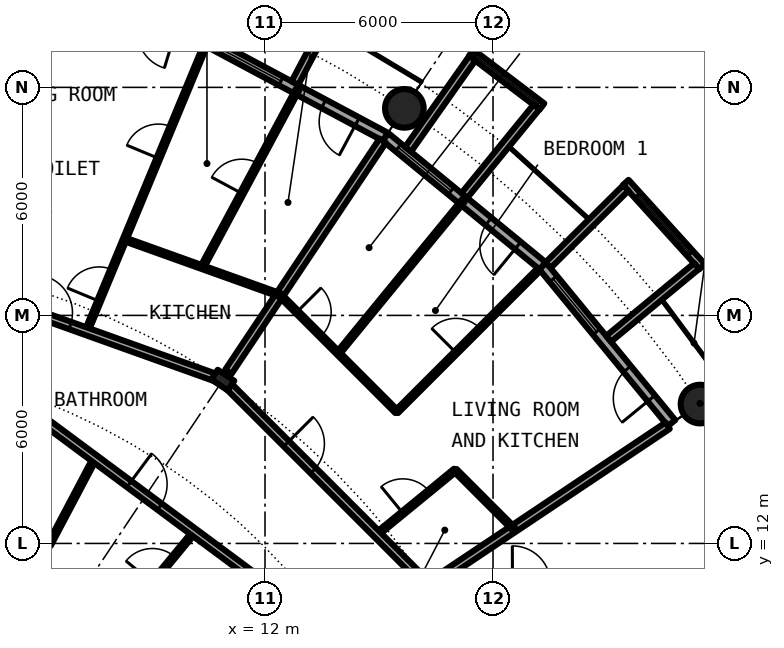
"""IFC4 building model, lengths in metres.
Left out: names, types, materials, properties, quantities, classifications, styles, units other than length and angle.
Written with IfcOpenShell. Run it as: python <this file> out.ifc"""

import sys

from ifc_helpers import new_model, si_unit, direction, frame, frame_2d, origin, origin_2d, place, context, subcontext, project, spatial, rectangle, circle, hollow_circle, i_section, extrude, element, fill, save


model = new_model("IFC4")
c1 = context("Model", 3, precision=1e-05, world=origin(), true_north=direction((0.0, 1.0)))
c2 = subcontext(c1, "Body", "Model", "MODEL_VIEW")
j1 = project(units=[si_unit("LENGTHUNIT", "METRE"), si_unit("PLANEANGLEUNIT", "RADIAN")], contexts=[c1])
p1 = place(None, origin())
s1 = spatial("IfcSite", under=j1, at=p1, CompositionType="ELEMENT")
p2 = place(p1, origin())
s2 = spatial("IfcBuilding", under=s1, at=p2, CompositionType="ELEMENT")
p3 = place(p2, frame((0.0, 0.0, 63.6)))
s3 = spatial("IfcBuildingStorey", under=s2, at=p3, CompositionType="ELEMENT", Elevation=63.6)
for number, where, z_axis, x_axis in (
    (1, (23.448, 15.667, 0.0), (0.0, 0.0, 1.0), (1.0, 0.0, 0.0)),
    (2, (15.667, 23.448, 0.0), (0.0, 0.0, 1.0), (1.0, 0.0, 0.0)),
):
    element("IfcColumn", number, at=place(p3, frame(where, z_axis=z_axis, x_axis=x_axis)), inside=s3, PredefinedType="COLUMN", context=c2, shape_type="SweptSolid", body=[
        extrude(hollow_circle(Radius=0.508, WallThickness=0.04, at=origin_2d()), origin(), (0.0, 0.0, 1.0), 3.05),
    ])
p4 = place(p3, frame((10.889, 16.297, 0.0), z_axis=(0.0, 0.0, 1.0), x_axis=(0.55557023302, 0.831469612303, 0.0)))
e3 = element("IfcColumn", 3, at=p4, inside=s3, PredefinedType="COLUMN", context=c2, shape_type="SweptSolid", body=[
    extrude(i_section(OverallWidth=0.306, OverallDepth=0.524, WebThickness=0.021, FlangeThickness=0.04, FilletRadius=0.027, at=origin_2d()), origin(), (0.0, 0.0, 1.0), 3.05),
])
p5 = place(p3, frame((22.699, 15.167, 0.0), z_axis=(0.0, 0.0, 1.0), x_axis=(-0.634382322723, 0.773019449054, 0.0)))
e4 = element("IfcWall", 4, at=p5, inside=s3, PredefinedType="SOLIDWALL", context=c2, shape_type="SweptSolid", body=[
    extrude(rectangle(XDim=5.352, YDim=0.25, at=frame_2d((2.676, 0.0))), origin(), (0.0, 0.0, 1.0), 2.7),
])
p6 = place(p5, frame((0.841, 0.0, 0.0)))
e5 = element("IfcOpeningElement", 5, at=p6, cuts=e4, PredefinedType="OPENING", context=c2, shape_type="SweptSolid", body=[
    extrude(rectangle(XDim=1.0, YDim=2.2, at=frame_2d((0.5, 1.1))), frame((0.0, 0.135, 0.0), z_axis=(0.0, -1.0, 0.0), x_axis=(1.0, 0.0, 0.0)), (0.0, 0.0, 1.0), 0.27),
])
p7 = place(p5, frame((3.111, 0.0, 0.3)))
e6 = element("IfcOpeningElement", 6, at=p7, cuts=e4, PredefinedType="OPENING", context=c2, shape_type="SweptSolid", body=[
    extrude(rectangle(XDim=1.8, YDim=2.1, at=frame_2d((0.9, 1.05))), frame((0.0, 0.135, 0.0), z_axis=(0.0, -1.0, 0.0), x_axis=(1.0, 0.0, 0.0)), (0.0, 0.0, 1.0), 0.27),
])
p8 = place(p3, frame((23.503, 19.282, -0.03), z_axis=(0.0, 0.0, 1.0), x_axis=(-0.671506829416, 0.740998365753, 0.0)))
e7 = element("IfcWall", 7, at=p8, inside=s3, PredefinedType="SOLIDWALL", context=c2, shape_type="SweptSolid", body=[
    extrude(rectangle(XDim=2.993, YDim=0.2, at=frame_2d((1.497, 0.0))), origin(), (0.0, 0.0, 1.0), 2.73),
])
p9 = place(p8, frame((0.457, 0.0, 0.33)))
e8 = element("IfcOpeningElement", 8, at=p9, cuts=e7, PredefinedType="OPENING", context=c2, shape_type="SweptSolid", body=[
    extrude(circle(Radius=1.04, at=frame_2d((1.04, 1.04))), frame((0.0, 0.11, 0.0), z_axis=(0.0, -1.0, 0.0), x_axis=(1.0, 0.0, 0.0)), (0.0, 0.0, 1.0), 0.22),
])
p10 = place(p3, frame((21.041, 17.384, -0.03), z_axis=(0.0, 0.0, 1.0), x_axis=(0.770784861449, 0.63709551667, 0.0)))
e9 = element("IfcWall", 9, at=p10, inside=s3, PredefinedType="SOLIDWALL", context=c2, shape_type="SweptSolid", body=[
    extrude(rectangle(XDim=3.006, YDim=0.2, at=frame_2d((1.503, 0.0))), origin(), (0.0, 0.0, 1.0), 2.73),
])
p11 = place(p3, frame((19.45, 19.323, -0.03), z_axis=(0.0, 0.0, 1.0), x_axis=(0.709727076896, 0.704476739375, 0.0)))
e10 = element("IfcWall", 10, at=p11, inside=s3, PredefinedType="SOLIDWALL", context=c2, shape_type="SweptSolid", body=[
    extrude(rectangle(XDim=2.883, YDim=0.2, at=frame_2d((1.441, 0.0))), origin(), (0.0, 0.0, 1.0), 2.73),
])
p12 = place(p3, frame((19.304, 19.304, 0.0), z_axis=(0.0, 0.0, 1.0), x_axis=(-0.773019449054, 0.634382322723, 0.0)))
e11 = element("IfcWall", 11, at=p12, inside=s3, PredefinedType="SOLIDWALL", context=c2, shape_type="SweptSolid", body=[
    extrude(rectangle(XDim=5.352, YDim=0.25, at=frame_2d((2.676, 0.0))), origin(), (0.0, 0.0, 1.0), 2.7),
])
p13 = place(p12, frame((0.841, 0.0, 0.0)))
e12 = element("IfcOpeningElement", 12, at=p13, cuts=e11, PredefinedType="OPENING", context=c2, shape_type="SweptSolid", body=[
    extrude(rectangle(XDim=1.0, YDim=2.2, at=frame_2d((0.5, 1.1))), frame((0.0, 0.135, 0.0), z_axis=(0.0, -1.0, 0.0), x_axis=(1.0, 0.0, 0.0)), (0.0, 0.0, 1.0), 0.27),
])
p14 = place(p12, frame((3.111, 0.0, 0.3)))
e13 = element("IfcOpeningElement", 13, at=p14, cuts=e11, PredefinedType="OPENING", context=c2, shape_type="SweptSolid", body=[
    extrude(rectangle(XDim=1.8, YDim=2.1, at=frame_2d((0.9, 1.05))), frame((0.0, 0.135, 0.0), z_axis=(0.0, -1.0, 0.0), x_axis=(1.0, 0.0, 0.0)), (0.0, 0.0, 1.0), 0.27),
])
p15 = place(p3, frame((19.289, 23.497, -0.03), z_axis=(0.0, 0.0, 1.0), x_axis=(-0.796842165306, 0.60418752353, 0.0)))
e14 = element("IfcWall", 14, at=p15, inside=s3, PredefinedType="SOLIDWALL", context=c2, shape_type="SweptSolid", body=[
    extrude(rectangle(XDim=2.337, YDim=0.2, at=frame_2d((1.168, 0.0))), origin(), (0.0, 0.0, 1.0), 2.73),
])
p16 = place(p15, frame((0.128, 0.0, 0.33)))
e15 = element("IfcOpeningElement", 15, at=p16, cuts=e14, PredefinedType="OPENING", context=c2, shape_type="SweptSolid", body=[
    extrude(circle(Radius=1.04, at=frame_2d((1.04, 1.04))), frame((0.0, 0.11, 0.0), z_axis=(0.0, -1.0, 0.0), x_axis=(1.0, 0.0, 0.0)), (0.0, 0.0, 1.0), 0.22),
])
p17 = place(p3, frame((17.246, 21.155, -0.03), z_axis=(0.0, 0.0, 1.0), x_axis=(0.631741648902, 0.775179004516, 0.0)))
e16 = element("IfcWall", 16, at=p17, inside=s3, PredefinedType="SOLIDWALL", context=c2, shape_type="SweptSolid", body=[
    extrude(rectangle(XDim=3.006, YDim=0.2, at=frame_2d((1.503, 0.0))), origin(), (0.0, 0.0, 1.0), 2.73),
])
p18 = place(p3, frame((15.765, 22.37, -0.03), z_axis=(0.0, 0.0, 1.0), x_axis=(0.576274612209, 0.817256123454, 0.0)))
e17 = element("IfcWall", 17, at=p18, inside=s3, PredefinedType="SOLIDWALL", context=c2, shape_type="SweptSolid", body=[
    extrude(rectangle(XDim=2.933, YDim=0.2, at=frame_2d((1.466, 0.0))), origin(), (0.0, 0.0, 1.0), 2.73),
])
p19 = place(p3, frame((15.167, 22.699, 0.0), z_axis=(0.0, 0.0, 1.0), x_axis=(-0.881915646801, 0.471407246368, 0.0)))
e18 = element("IfcWall", 18, at=p19, inside=s3, PredefinedType="SOLIDWALL", context=c2, shape_type="SweptSolid", body=[
    extrude(rectangle(XDim=5.352, YDim=0.25, at=frame_2d((2.676, 0.0))), origin(), (0.0, 0.0, 1.0), 2.7),
])
p20 = place(p19, frame((0.841, 0.0, 0.0)))
e19 = element("IfcOpeningElement", 19, at=p20, cuts=e18, PredefinedType="OPENING", context=c2, shape_type="SweptSolid", body=[
    extrude(rectangle(XDim=1.0, YDim=2.2, at=frame_2d((0.5, 1.1))), frame((0.0, 0.135, 0.0), z_axis=(0.0, -1.0, 0.0), x_axis=(1.0, 0.0, 0.0)), (0.0, 0.0, 1.0), 0.27),
])
p21 = place(p19, frame((3.111, 0.0, 0.3)))
e20 = element("IfcOpeningElement", 20, at=p21, cuts=e18, PredefinedType="OPENING", context=c2, shape_type="SweptSolid", body=[
    extrude(rectangle(XDim=1.8, YDim=2.1, at=frame_2d((0.9, 1.05))), frame((0.0, 0.135, 0.0), z_axis=(0.0, -1.0, 0.0), x_axis=(1.0, 0.0, 0.0)), (0.0, 0.0, 1.0), 0.27),
])
p22 = place(p3, frame((12.787, 24.113, -0.03), z_axis=(0.0, 0.0, 1.0), x_axis=(0.468365282436, 0.883534924159, 0.0)))
e21 = element("IfcWall", 21, at=p22, inside=s3, PredefinedType="SOLIDWALL", context=c2, shape_type="SweptSolid", body=[
    extrude(rectangle(XDim=3.006, YDim=0.2, at=frame_2d((1.503, 0.0))), origin(), (0.0, 0.0, 1.0), 2.73),
])
p23 = place(p3, frame((4.909, 5.958, 0.0), z_axis=(0.0, 0.0, 1.0), x_axis=(0.635976043025, 0.771708800454, 0.0)))
e22 = element("IfcWall", 22, at=p23, inside=s3, PredefinedType="PARTITIONING", context=c2, shape_type="SweptSolid", body=[
    extrude(rectangle(XDim=8.213, YDim=0.1, at=frame_2d((4.106, 0.0))), origin(), (0.0, 0.0, 1.0), 2.7),
])
p24 = place(p23, frame((6.49, 0.0, 0.0)))
e23 = element("IfcOpeningElement", 23, at=p24, cuts=e22, PredefinedType="OPENING", context=c2, shape_type="SweptSolid", body=[
    extrude(rectangle(XDim=0.9, YDim=2.3, at=frame_2d((0.45, 1.15))), frame((0.0, 0.06, 0.0), z_axis=(0.0, -1.0, 0.0), x_axis=(1.0, 0.0, 0.0)), (0.0, 0.0, 1.0), 0.12),
])
p25 = place(p23, frame((2.384, 0.0, 0.0)))
e24 = element("IfcOpeningElement", 24, at=p25, cuts=e22, PredefinedType="OPENING", context=c2, shape_type="SweptSolid", body=[
    extrude(rectangle(XDim=0.9, YDim=2.3, at=frame_2d((0.45, 1.15))), frame((0.0, 0.06, 0.0), z_axis=(0.0, -1.0, 0.0), x_axis=(1.0, 0.0, 0.0)), (0.0, 0.0, 1.0), 0.12),
])
p26 = place(p3, frame((6.318, 11.96, 0.0), z_axis=(0.0, 0.0, 1.0), x_axis=(0.467001992543, 0.884256263173, 0.0)))
e25 = element("IfcWall", 25, at=p26, inside=s3, PredefinedType="PARTITIONING", context=c2, shape_type="SweptSolid", body=[
    extrude(rectangle(XDim=2.572, YDim=0.1, at=frame_2d((1.286, 0.0))), origin(), (0.0, 0.0, 1.0), 2.7),
])
p27 = place(p3, frame((7.302, 17.58, 0.0), z_axis=(0.0, 0.0, 1.0), x_axis=(0.383616168183, 0.923492628833, 0.0)))
e26 = element("IfcWall", 26, at=p27, inside=s3, PredefinedType="PARTITIONING", context=c2, shape_type="SweptSolid", body=[
    extrude(rectangle(XDim=8.138, YDim=0.1, at=frame_2d((4.069, 0.0))), origin(), (0.0, 0.0, 1.0), 2.7),
])
p28 = place(p27, frame((0.861, 0.0, 0.0)))
e27 = element("IfcOpeningElement", 27, at=p28, cuts=e26, PredefinedType="OPENING", context=c2, shape_type="SweptSolid", body=[
    extrude(rectangle(XDim=0.9, YDim=2.3, at=frame_2d((0.45, 1.15))), frame((0.0, 0.06, 0.0), z_axis=(0.0, -1.0, 0.0), x_axis=(1.0, 0.0, 0.0)), (0.0, 0.0, 1.0), 0.12),
])
p29 = place(p27, frame((4.931, 0.0, 0.0)))
e28 = element("IfcOpeningElement", 28, at=p29, cuts=e26, PredefinedType="OPENING", context=c2, shape_type="SweptSolid", body=[
    extrude(rectangle(XDim=0.9, YDim=2.3, at=frame_2d((0.45, 1.15))), frame((0.0, 0.06, 0.0), z_axis=(0.0, -1.0, 0.0), x_axis=(1.0, 0.0, 0.0)), (0.0, 0.0, 1.0), 0.12),
])
p30 = place(p3, frame((10.349, 19.272, 0.0), z_axis=(0.0, 0.0, 1.0), x_axis=(0.472967735543, 0.881079747319, 0.0)))
e29 = element("IfcWall", 29, at=p30, inside=s3, PredefinedType="PARTITIONING", context=c2, shape_type="SweptSolid", body=[
    extrude(rectangle(XDim=5.3, YDim=0.1, at=frame_2d((2.65, 0.0))), origin(), (0.0, 0.0, 1.0), 2.7),
])
p31 = place(p30, frame((2.2, 0.0, 0.0)))
e30 = element("IfcOpeningElement", 30, at=p31, cuts=e29, PredefinedType="OPENING", context=c2, shape_type="SweptSolid", body=[
    extrude(rectangle(XDim=0.9, YDim=2.3, at=frame_2d((0.45, 1.15))), frame((0.0, 0.06, 0.0), z_axis=(0.0, -1.0, 0.0), x_axis=(1.0, 0.0, 0.0)), (0.0, 0.0, 1.0), 0.12),
])
p32 = place(p3, frame((11.035, 16.515, 0.0), z_axis=(0.0, 0.0, 1.0), x_axis=(0.555516661303, 0.831505405283, 0.0)))
e31 = element("IfcWall", 31, at=p32, inside=s3, PredefinedType="PARTITIONING", context=c2, shape_type="SweptSolid", body=[
    extrude(rectangle(XDim=7.312, YDim=0.2, at=frame_2d((3.656, 0.0))), origin(), (0.0, 0.0, 1.0), 2.7),
])
p33 = place(p3, frame((13.927, 17.004, 0.0), z_axis=(0.0, 0.0, 1.0), x_axis=(0.633774976367, 0.773517471898, 0.0)))
e32 = element("IfcWall", 32, at=p33, inside=s3, PredefinedType="PARTITIONING", context=c2, shape_type="SweptSolid", body=[
    extrude(rectangle(XDim=5.196, YDim=0.1, at=frame_2d((2.598, 0.0))), origin(), (0.0, 0.0, 1.0), 2.7),
])
p34 = place(p3, frame((14.945, 12.241, 0.0), z_axis=(0.0, 0.0, 1.0), x_axis=(0.77367517848, 0.633582447834, 0.0)))
e33 = element("IfcWall", 33, at=p34, inside=s3, PredefinedType="PARTITIONING", context=c2, shape_type="SweptSolid", body=[
    extrude(rectangle(XDim=2.661, YDim=0.1, at=frame_2d((1.331, 0.0))), origin(), (0.0, 0.0, 1.0), 2.7),
])
p35 = place(p34, frame((0.881, 0.0, 0.0)))
e34 = element("IfcOpeningElement", 34, at=p35, cuts=e33, PredefinedType="OPENING", context=c2, shape_type="SweptSolid", body=[
    extrude(rectangle(XDim=0.9, YDim=2.3, at=frame_2d((0.45, 1.15))), frame((0.0, 0.06, 0.0), z_axis=(0.0, -1.0, 0.0), x_axis=(1.0, 0.0, 0.0)), (0.0, 0.0, 1.0), 0.12),
])
p36 = place(p3, frame((15.465, 15.465, 0.0), z_axis=(0.0, 0.0, 1.0), x_axis=(0.707106781187, 0.707106781187, 0.0)))
e35 = element("IfcWall", 35, at=p36, inside=s3, PredefinedType="PARTITIONING", context=c2, shape_type="SweptSolid", body=[
    extrude(rectangle(XDim=5.305, YDim=0.1, at=frame_2d((2.652, 0.0))), origin(), (0.0, 0.0, 1.0), 2.7),
])
p37 = place(p36, frame((2.202, 0.0, 0.0)))
e36 = element("IfcOpeningElement", 36, at=p37, cuts=e35, PredefinedType="OPENING", context=c2, shape_type="SweptSolid", body=[
    extrude(rectangle(XDim=0.9, YDim=2.3, at=frame_2d((0.45, 1.15))), frame((0.0, 0.06, 0.0), z_axis=(0.0, -1.0, 0.0), x_axis=(1.0, 0.0, 0.0)), (0.0, 0.0, 1.0), 0.12),
])
p38 = place(p3, frame((16.515, 11.034, 0.0), z_axis=(0.0, 0.0, 1.0), x_axis=(0.831382022135, 0.555701298605, 0.0)))
e37 = element("IfcWall", 37, at=p38, inside=s3, PredefinedType="PARTITIONING", context=c2, shape_type="SweptSolid", body=[
    extrude(rectangle(XDim=7.313, YDim=0.2, at=frame_2d((3.657, 0.0))), origin(), (0.0, 0.0, 1.0), 2.7),
])
p39 = place(p3, frame((4.906, 16.172, 0.0), z_axis=(0.0, 0.0, 1.0), x_axis=(0.803191461888, -0.595720971219, 0.0)))
e38 = element("IfcWall", 38, at=p39, inside=s3, PredefinedType="PARTITIONING", context=c2, shape_type="SweptSolid", body=[
    extrude(rectangle(XDim=9.76, YDim=0.2, at=frame_2d((4.88, 0.0))), origin(), (0.0, 0.0, 1.0), 2.7),
])
p40 = place(p39, frame((4.38, 0.0, 0.0)))
e39 = element("IfcOpeningElement", 39, at=p40, cuts=e38, PredefinedType="OPENING", context=c2, shape_type="SweptSolid", body=[
    extrude(rectangle(XDim=1.0, YDim=2.3, at=frame_2d((0.5, 1.15))), frame((0.0, 0.11, 0.0), z_axis=(0.0, -1.0, 0.0), x_axis=(1.0, 0.0, 0.0)), (0.0, 0.0, 1.0), 0.22),
])
p41 = place(p3, frame((1.924, 19.505, 0.0), z_axis=(0.0, 0.0, 1.0), x_axis=(0.941497449807, -0.337020106237, 0.0)))
e40 = element("IfcWall", 40, at=p41, inside=s3, PredefinedType="PARTITIONING", context=c2, shape_type="SweptSolid", body=[
    extrude(rectangle(XDim=9.364, YDim=0.2, at=frame_2d((4.682, 0.0))), origin(), (0.0, 0.0, 1.0), 2.38),
])
p42 = place(p41, frame((4.259, 0.0, 0.0)))
e41 = element("IfcOpeningElement", 41, at=p42, cuts=e40, PredefinedType="OPENING", context=c2, shape_type="SweptSolid", body=[
    extrude(rectangle(XDim=1.0, YDim=2.3, at=frame_2d((0.5, 1.15))), frame((0.0, 0.11, 0.0), z_axis=(0.0, -1.0, 0.0), x_axis=(1.0, 0.0, 0.0)), (0.0, 0.0, 1.0), 0.22),
])
p43 = place(p3, frame((11.0, 16.186, 0.0), z_axis=(0.0, 0.0, 1.0), x_axis=(0.707106781187, -0.707106781187, 0.0)))
e42 = element("IfcWall", 42, at=p43, inside=s3, PredefinedType="PARTITIONING", context=c2, shape_type="SweptSolid", body=[
    extrude(rectangle(XDim=7.334, YDim=0.2, at=frame_2d((3.667, 0.0))), origin(), (0.0, 0.0, 1.0), 2.38),
])
p44 = place(p43, frame((2.211, 0.0, 0.0)))
e43 = element("IfcOpeningElement", 43, at=p44, cuts=e42, PredefinedType="OPENING", context=c2, shape_type="SweptSolid", body=[
    extrude(rectangle(XDim=1.0, YDim=2.3, at=frame_2d((0.5, 1.15))), frame((0.0, 0.11, 0.0), z_axis=(0.0, -1.0, 0.0), x_axis=(1.0, 0.0, 0.0)), (0.0, 0.0, 1.0), 0.22),
])
p45 = place(p3, frame((8.318, 19.996, 0.0), z_axis=(0.0, 0.0, 1.0), x_axis=(0.941370462946, -0.337374645598, 0.0)))
e44 = element("IfcWall", 44, at=p45, inside=s3, PredefinedType="PARTITIONING", context=c2, shape_type="SweptSolid", body=[
    extrude(rectangle(XDim=4.334, YDim=0.1, at=frame_2d((2.167, 0.0))), origin(), (0.0, 0.0, 1.0), 2.7),
])
p46 = place(p3, frame((12.389, 18.542, 0.0), z_axis=(0.0, 0.0, 1.0), x_axis=(0.707022606819, -0.707190945535, 0.0)))
e45 = element("IfcWall", 45, at=p46, inside=s3, PredefinedType="PARTITIONING", context=c2, shape_type="SweptSolid", body=[
    extrude(rectangle(XDim=4.351, YDim=0.1, at=frame_2d((2.175, 0.0))), origin(), (0.0, 0.0, 1.0), 2.7),
])
p47 = place(p46, frame((0.639, 0.0, 0.0)))
e46 = element("IfcOpeningElement", 46, at=p47, cuts=e45, PredefinedType="OPENING", context=c2, shape_type="SweptSolid", body=[
    extrude(rectangle(XDim=0.9, YDim=2.3, at=frame_2d((0.45, 1.15))), frame((0.0, 0.06, 0.0), z_axis=(0.0, -1.0, 0.0), x_axis=(1.0, 0.0, 0.0)), (0.0, 0.0, 1.0), 0.12),
])
p48 = place(p3, frame((17.006, 13.924, 0.0), z_axis=(0.0, 0.0, 1.0), x_axis=(0.706826194425, -0.707387256653, 0.0)))
e47 = element("IfcWall", 47, at=p48, inside=s3, PredefinedType="PARTITIONING", context=c2, shape_type="SweptSolid", body=[
    extrude(rectangle(XDim=2.176, YDim=0.1, at=frame_2d((1.088, 0.0))), origin(), (0.0, 0.0, 1.0), 2.7),
])
p49 = place(p6, origin())
e48 = element("IfcDoor", 48, at=p49, inside=s3, OperationType="SINGLE_SWING_LEFT", PredefinedType="DOOR", context=c2, shape_type="SweptSolid", body=[
    extrude(rectangle(XDim=1.0, YDim=2.2, at=frame_2d((0.5, 1.1))), frame((0.0, 0.025, 0.0), z_axis=(0.0, -1.0, 0.0), x_axis=(1.0, 0.0, 0.0)), (0.0, 0.0, 1.0), 0.05),
])
fill(e5, e48)
p50 = place(p7, origin())
e49 = element("IfcWindow", 49, at=p50, inside=s3, PartitioningType="SINGLE_PANEL", PredefinedType="WINDOW", context=c2, shape_type="SweptSolid", body=[
    extrude(rectangle(XDim=1.8, YDim=2.1, at=frame_2d((0.9, 1.05))), frame((0.0, 0.03, 0.0), z_axis=(0.0, -1.0, 0.0), x_axis=(1.0, 0.0, 0.0)), (0.0, 0.0, 1.0), 0.06),
])
fill(e6, e49)
p51 = place(p9, origin())
e50 = element("IfcWindow", 50, at=p51, inside=s3, PartitioningType="SINGLE_PANEL", PredefinedType="WINDOW", context=c2, shape_type="SweptSolid", body=[
    extrude(circle(Radius=1.04, at=frame_2d((1.04, 1.04))), frame((0.0, 0.03, 0.0), z_axis=(0.0, -1.0, 0.0), x_axis=(1.0, 0.0, 0.0)), (0.0, 0.0, 1.0), 0.06),
])
fill(e8, e50)
p52 = place(p13, origin())
e51 = element("IfcDoor", 51, at=p52, inside=s3, OperationType="SINGLE_SWING_LEFT", PredefinedType="DOOR", context=c2, shape_type="SweptSolid", body=[
    extrude(rectangle(XDim=1.0, YDim=2.2, at=frame_2d((0.5, 1.1))), frame((0.0, 0.025, 0.0), z_axis=(0.0, -1.0, 0.0), x_axis=(1.0, 0.0, 0.0)), (0.0, 0.0, 1.0), 0.05),
])
fill(e12, e51)
p53 = place(p14, origin())
e52 = element("IfcWindow", 52, at=p53, inside=s3, PartitioningType="SINGLE_PANEL", PredefinedType="WINDOW", context=c2, shape_type="SweptSolid", body=[
    extrude(rectangle(XDim=1.8, YDim=2.1, at=frame_2d((0.9, 1.05))), frame((0.0, 0.03, 0.0), z_axis=(0.0, -1.0, 0.0), x_axis=(1.0, 0.0, 0.0)), (0.0, 0.0, 1.0), 0.06),
])
fill(e13, e52)
p54 = place(p16, origin())
e53 = element("IfcWindow", 53, at=p54, inside=s3, PartitioningType="SINGLE_PANEL", PredefinedType="WINDOW", context=c2, shape_type="SweptSolid", body=[
    extrude(circle(Radius=1.04, at=frame_2d((1.04, 1.04))), frame((0.0, 0.03, 0.0), z_axis=(0.0, -1.0, 0.0), x_axis=(1.0, 0.0, 0.0)), (0.0, 0.0, 1.0), 0.06),
])
fill(e15, e53)
p55 = place(p20, origin())
e54 = element("IfcDoor", 54, at=p55, inside=s3, OperationType="SINGLE_SWING_LEFT", PredefinedType="DOOR", context=c2, shape_type="SweptSolid", body=[
    extrude(rectangle(XDim=1.0, YDim=2.2, at=frame_2d((0.5, 1.1))), frame((0.0, 0.025, 0.0), z_axis=(0.0, -1.0, 0.0), x_axis=(1.0, 0.0, 0.0)), (0.0, 0.0, 1.0), 0.05),
])
fill(e19, e54)
p56 = place(p21, origin())
e55 = element("IfcWindow", 55, at=p56, inside=s3, PartitioningType="SINGLE_PANEL", PredefinedType="WINDOW", context=c2, shape_type="SweptSolid", body=[
    extrude(rectangle(XDim=1.8, YDim=2.1, at=frame_2d((0.9, 1.05))), frame((0.0, 0.03, 0.0), z_axis=(0.0, -1.0, 0.0), x_axis=(1.0, 0.0, 0.0)), (0.0, 0.0, 1.0), 0.06),
])
fill(e20, e55)
p57 = place(p44, origin())
e56 = element("IfcDoor", 56, at=p57, inside=s3, OperationType="SINGLE_SWING_LEFT", PredefinedType="DOOR", context=c2, shape_type="SweptSolid", body=[
    extrude(rectangle(XDim=1.0, YDim=2.3, at=frame_2d((0.5, 1.15))), frame((0.0, 0.025, 0.0), z_axis=(0.0, -1.0, 0.0), x_axis=(1.0, 0.0, 0.0)), (0.0, 0.0, 1.0), 0.05),
])
fill(e43, e56)
p58 = place(p35, origin())
e57 = element("IfcDoor", 57, at=p58, inside=s3, OperationType="SINGLE_SWING_LEFT", PredefinedType="DOOR", context=c2, shape_type="SweptSolid", body=[
    extrude(rectangle(XDim=0.9, YDim=2.3, at=frame_2d((0.45, 1.15))), frame((0.0, 0.025, 0.0), z_axis=(0.0, -1.0, 0.0), x_axis=(1.0, 0.0, 0.0)), (0.0, 0.0, 1.0), 0.05),
])
fill(e34, e57)
p59 = place(p37, origin())
e58 = element("IfcDoor", 58, at=p59, inside=s3, OperationType="SINGLE_SWING_RIGHT", PredefinedType="DOOR", context=c2, shape_type="SweptSolid", body=[
    extrude(rectangle(XDim=0.9, YDim=2.3, at=frame_2d((0.45, 1.15))), frame((0.0, 0.025, 0.0), z_axis=(0.0, -1.0, 0.0), x_axis=(1.0, 0.0, 0.0)), (0.0, 0.0, 1.0), 0.05),
])
fill(e36, e58)
p60 = place(p47, origin())
e59 = element("IfcDoor", 59, at=p60, inside=s3, OperationType="SINGLE_SWING_LEFT", PredefinedType="DOOR", context=c2, shape_type="SweptSolid", body=[
    extrude(rectangle(XDim=0.9, YDim=2.3, at=frame_2d((0.45, 1.15))), frame((0.0, 0.025, 0.0), z_axis=(0.0, -1.0, 0.0), x_axis=(1.0, 0.0, 0.0)), (0.0, 0.0, 1.0), 0.05),
])
fill(e46, e59)
p61 = place(p42, origin())
e60 = element("IfcDoor", 60, at=p61, inside=s3, OperationType="SINGLE_SWING_RIGHT", PredefinedType="DOOR", context=c2, shape_type="SweptSolid", body=[
    extrude(rectangle(XDim=1.0, YDim=2.3, at=frame_2d((0.5, 1.15))), frame((0.0, 0.025, 0.0), z_axis=(0.0, -1.0, 0.0), x_axis=(1.0, 0.0, 0.0)), (0.0, 0.0, 1.0), 0.05),
])
fill(e41, e60)
p62 = place(p28, origin())
e61 = element("IfcDoor", 61, at=p62, inside=s3, OperationType="SINGLE_SWING_LEFT", PredefinedType="DOOR", context=c2, shape_type="SweptSolid", body=[
    extrude(rectangle(XDim=0.9, YDim=2.3, at=frame_2d((0.45, 1.15))), frame((0.0, 0.025, 0.0), z_axis=(0.0, -1.0, 0.0), x_axis=(1.0, 0.0, 0.0)), (0.0, 0.0, 1.0), 0.05),
])
fill(e27, e61)
p63 = place(p29, origin())
e62 = element("IfcDoor", 62, at=p63, inside=s3, OperationType="SINGLE_SWING_RIGHT", PredefinedType="DOOR", context=c2, shape_type="SweptSolid", body=[
    extrude(rectangle(XDim=0.9, YDim=2.3, at=frame_2d((0.45, 1.15))), frame((0.0, 0.025, 0.0), z_axis=(0.0, -1.0, 0.0), x_axis=(1.0, 0.0, 0.0)), (0.0, 0.0, 1.0), 0.05),
])
fill(e28, e62)
p64 = place(p31, origin())
e63 = element("IfcDoor", 63, at=p64, inside=s3, OperationType="SINGLE_SWING_RIGHT", PredefinedType="DOOR", context=c2, shape_type="SweptSolid", body=[
    extrude(rectangle(XDim=0.9, YDim=2.3, at=frame_2d((0.45, 1.15))), frame((0.0, 0.025, 0.0), z_axis=(0.0, -1.0, 0.0), x_axis=(1.0, 0.0, 0.0)), (0.0, 0.0, 1.0), 0.05),
])
fill(e30, e63)
p65 = place(p40, origin())
e64 = element("IfcDoor", 64, at=p65, inside=s3, OperationType="SINGLE_SWING_LEFT", PredefinedType="DOOR", context=c2, shape_type="SweptSolid", body=[
    extrude(rectangle(XDim=1.0, YDim=2.3, at=frame_2d((0.5, 1.15))), frame((0.0, 0.025, 0.0), z_axis=(0.0, -1.0, 0.0), x_axis=(1.0, 0.0, 0.0)), (0.0, 0.0, 1.0), 0.05),
])
fill(e39, e64)
p66 = place(p24, origin())
e65 = element("IfcDoor", 65, at=p66, inside=s3, OperationType="SINGLE_SWING_RIGHT", PredefinedType="DOOR", context=c2, shape_type="SweptSolid", body=[
    extrude(rectangle(XDim=0.9, YDim=2.3, at=frame_2d((0.45, 1.15))), frame((0.0, 0.025, 0.0), z_axis=(0.0, -1.0, 0.0), x_axis=(1.0, 0.0, 0.0)), (0.0, 0.0, 1.0), 0.05),
])
fill(e23, e65)
save(model, sys.argv[1])
